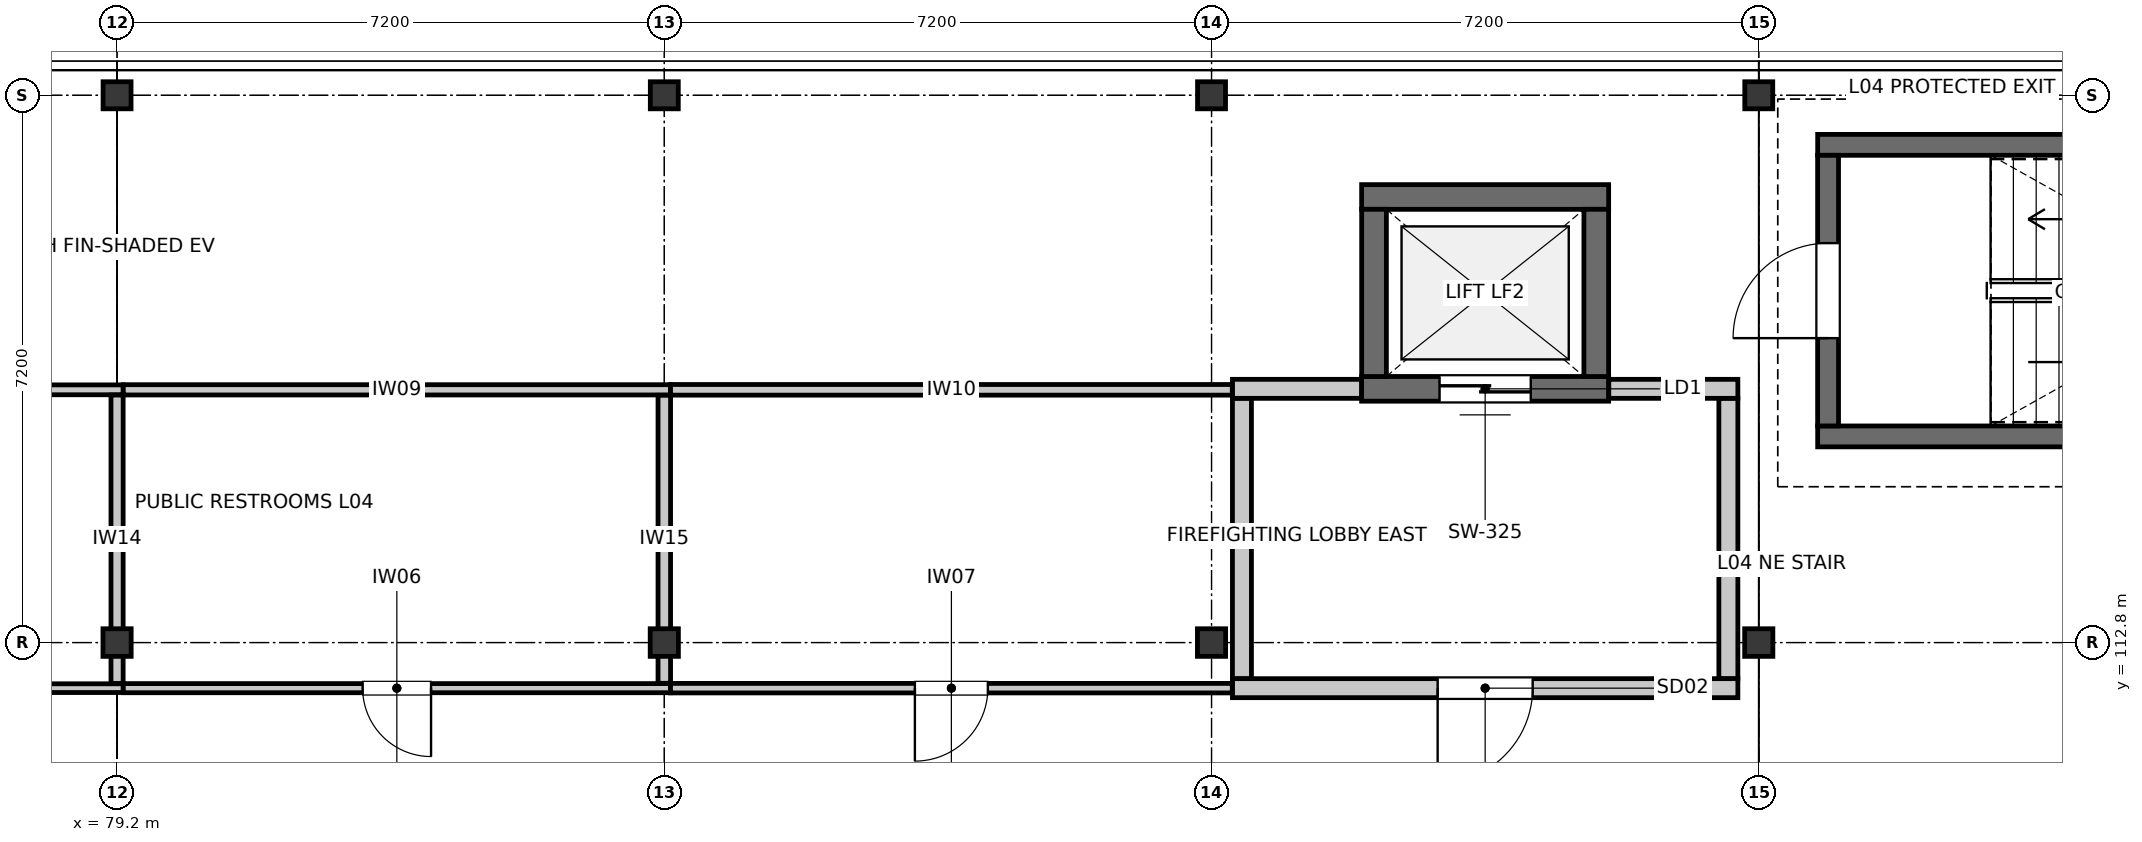
"""IFC4 building model, lengths in metres.
Left out: names, types, materials, properties, quantities, classifications, styles, units other than length and angle.
Written with IfcOpenShell. Run it as: python <this file> out.ifc"""

import sys

from ifc_helpers import new_model, si_unit, direction, frame, frame_2d, origin, origin_2d, place, context, subcontext, project, spatial, rectangle, i_section, extrude, element, fill, save


model = new_model("IFC4")
c1 = context("Model", 3, precision=1e-05, world=origin(), true_north=direction((0.0, 1.0)))
c2 = subcontext(c1, "Body", "Model", "MODEL_VIEW")
j1 = project(units=[si_unit("LENGTHUNIT", "METRE"), si_unit("PLANEANGLEUNIT", "RADIAN")], contexts=[c1])
p1 = place(None, origin())
s1 = spatial("IfcSite", under=j1, at=p1, CompositionType="ELEMENT")
p2 = place(p1, origin())
s2 = spatial("IfcBuilding", under=s1, at=p2, CompositionType="ELEMENT")
p3 = place(p2, frame((0.0, 0.0, 17.1)))
s3 = spatial("IfcBuildingStorey", under=s2, at=p3, CompositionType="ELEMENT", Elevation=17.1)
p4 = place(p3, frame((79.2, 112.8, 0.0), z_axis=(0.0, 0.0, 1.0), x_axis=(1.0, 0.0, 0.0)))
e1 = element("IfcColumn", 1, at=p4, inside=s3, PredefinedType="COLUMN", context=c2, shape_type="SweptSolid", body=[
    extrude(i_section(OverallWidth=0.371, OverallDepth=0.363, WebThickness=0.013, FlangeThickness=0.022, FilletRadius=0.015, at=origin_2d()), origin(), (0.0, 0.0, 1.0), 3.9),
])
p5 = place(p3, frame((79.2, 120.0, 0.0), z_axis=(0.0, 0.0, 1.0), x_axis=(1.0, 0.0, 0.0)))
e2 = element("IfcColumn", 2, at=p5, inside=s3, PredefinedType="COLUMN", context=c2, shape_type="SweptSolid", body=[
    extrude(i_section(OverallWidth=0.368, OverallDepth=0.356, WebThickness=0.011, FlangeThickness=0.018, FilletRadius=0.015, at=origin_2d()), origin(), (0.0, 0.0, 1.0), 3.9),
])
p6 = place(p3, frame((86.4, 112.8, 0.0), z_axis=(0.0, 0.0, 1.0), x_axis=(1.0, 0.0, 0.0)))
e3 = element("IfcColumn", 3, at=p6, inside=s3, PredefinedType="COLUMN", context=c2, shape_type="SweptSolid", body=[
    extrude(i_section(OverallWidth=0.371, OverallDepth=0.363, WebThickness=0.013, FlangeThickness=0.022, FilletRadius=0.015, at=origin_2d()), origin(), (0.0, 0.0, 1.0), 3.9),
])
p7 = place(p3, frame((86.4, 120.0, 0.0), z_axis=(0.0, 0.0, 1.0), x_axis=(1.0, 0.0, 0.0)))
e4 = element("IfcColumn", 4, at=p7, inside=s3, PredefinedType="COLUMN", context=c2, shape_type="SweptSolid", body=[
    extrude(i_section(OverallWidth=0.368, OverallDepth=0.356, WebThickness=0.011, FlangeThickness=0.018, FilletRadius=0.015, at=origin_2d()), origin(), (0.0, 0.0, 1.0), 3.9),
])
p8 = place(p3, frame((93.6, 112.8, 0.0), z_axis=(0.0, 0.0, 1.0), x_axis=(1.0, 0.0, 0.0)))
e5 = element("IfcColumn", 5, at=p8, inside=s3, PredefinedType="COLUMN", context=c2, shape_type="SweptSolid", body=[
    extrude(i_section(OverallWidth=0.371, OverallDepth=0.363, WebThickness=0.013, FlangeThickness=0.022, FilletRadius=0.015, at=origin_2d()), origin(), (0.0, 0.0, 1.0), 3.9),
])
p9 = place(p3, frame((93.6, 120.0, 0.0), z_axis=(0.0, 0.0, 1.0), x_axis=(1.0, 0.0, 0.0)))
e6 = element("IfcColumn", 6, at=p9, inside=s3, PredefinedType="COLUMN", context=c2, shape_type="SweptSolid", body=[
    extrude(i_section(OverallWidth=0.368, OverallDepth=0.356, WebThickness=0.011, FlangeThickness=0.018, FilletRadius=0.015, at=origin_2d()), origin(), (0.0, 0.0, 1.0), 3.9),
])
p10 = place(p3, frame((100.8, 112.8, 0.0), z_axis=(0.0, 0.0, 1.0), x_axis=(1.0, 0.0, 0.0)))
e7 = element("IfcColumn", 7, at=p10, inside=s3, PredefinedType="COLUMN", context=c2, shape_type="SweptSolid", body=[
    extrude(i_section(OverallWidth=0.371, OverallDepth=0.363, WebThickness=0.013, FlangeThickness=0.022, FilletRadius=0.015, at=origin_2d()), origin(), (0.0, 0.0, 1.0), 3.9),
])
p11 = place(p3, frame((100.8, 120.0, 0.0), z_axis=(0.0, 0.0, 1.0), x_axis=(1.0, 0.0, 0.0)))
e8 = element("IfcColumn", 8, at=p11, inside=s3, PredefinedType="COLUMN", context=c2, shape_type="SweptSolid", body=[
    extrude(i_section(OverallWidth=0.368, OverallDepth=0.356, WebThickness=0.011, FlangeThickness=0.018, FilletRadius=0.015, at=origin_2d()), origin(), (0.0, 0.0, 1.0), 3.9),
])
for number, where, z_axis, x_axis in (
    (9, (110.475, 115.512, 0.0), (0.0, 0.0, 1.0), (-1.0, 0.0, 0.0)),
    (10, (101.575, 119.348, 0.0), (0.0, 0.0, 1.0), (1.0, 0.0, 0.0)),
):
    element("IfcWall", number, at=place(p3, frame(where, z_axis=z_axis, x_axis=x_axis)), inside=s3, PredefinedType="SOLIDWALL", context=c2, shape_type="SweptSolid", body=[
        extrude(rectangle(XDim=8.9, YDim=0.275, at=frame_2d((4.45, 0.0))), origin(), (0.0, 0.0, 1.0), 3.64),
    ])
p12 = place(p3, frame((101.712, 115.65, 0.0), z_axis=(0.0, 0.0, 1.0), x_axis=(0.0, 1.0, 0.0)))
e11 = element("IfcWall", 11, at=p12, inside=s3, PredefinedType="SOLIDWALL", context=c2, shape_type="SweptSolid", body=[
    extrude(rectangle(XDim=3.56, YDim=0.275, at=frame_2d((1.78, 0.0))), origin(), (0.0, 0.0, 1.0), 3.64),
])
p13 = place(p12, frame((1.155, 0.0, 0.0)))
e12 = element("IfcOpeningElement", 12, at=p13, cuts=e11, PredefinedType="OPENING", context=c2, shape_type="SweptSolid", body=[
    extrude(rectangle(XDim=1.25, YDim=2.2, at=frame_2d((0.625, 1.1))), frame((0.0, 0.147, 0.0), z_axis=(0.0, -1.0, 0.0), x_axis=(1.0, 0.0, 0.0)), (0.0, 0.0, 1.0), 0.295),
])
p14 = place(p3, frame((98.825, 116.138, 0.0), z_axis=(0.0, 0.0, 1.0), x_axis=(-1.0, 0.0, 0.0)))
e13 = element("IfcWall", 13, at=p14, inside=s3, PredefinedType="SHEAR", context=c2, shape_type="SweptSolid", body=[
    extrude(rectangle(XDim=3.25, YDim=0.325, at=frame_2d((1.625, 0.0))), origin(), (0.0, 0.0, 1.0), 3.64),
])
p15 = place(p14, frame((1.025, 0.0, 0.0)))
e14 = element("IfcOpeningElement", 14, at=p15, cuts=e13, PredefinedType="OPENING", context=c2, shape_type="SweptSolid", body=[
    extrude(rectangle(XDim=1.2, YDim=2.2, at=frame_2d((0.6, 1.1))), frame((0.0, 0.172, 0.0), z_axis=(0.0, -1.0, 0.0), x_axis=(1.0, 0.0, 0.0)), (0.0, 0.0, 1.0), 0.345),
])
p16 = place(p3, frame((95.575, 118.662, 0.0), z_axis=(0.0, 0.0, 1.0), x_axis=(1.0, 0.0, 0.0)))
e15 = element("IfcWall", 15, at=p16, inside=s3, PredefinedType="SHEAR", context=c2, shape_type="SweptSolid", body=[
    extrude(rectangle(XDim=3.25, YDim=0.325, at=frame_2d((1.625, 0.0))), origin(), (0.0, 0.0, 1.0), 3.64),
])
for number, where, z_axis, x_axis in (
    (16, (95.738, 116.3, 0.0), (0.0, 0.0, 1.0), (0.0, 1.0, 0.0)),
    (17, (98.662, 118.5, 0.0), (0.0, 0.0, 1.0), (0.0, -1.0, 0.0)),
):
    element("IfcWall", number, at=place(p3, frame(where, z_axis=z_axis, x_axis=x_axis)), inside=s3, PredefinedType="SHEAR", context=c2, shape_type="SweptSolid", body=[
        extrude(rectangle(XDim=2.2, YDim=0.325, at=frame_2d((1.1, 0.0))), origin(), (0.0, 0.0, 1.0), 3.64),
    ])
p17 = place(p3, frame((100.525, 112.2, 0.0), z_axis=(0.0, 0.0, 1.0), x_axis=(-1.0, 0.0, 0.0)))
e18 = element("IfcWall", 18, at=p17, inside=s3, PredefinedType="PARTITIONING", context=c2, shape_type="SweptSolid", body=[
    extrude(rectangle(XDim=6.65, YDim=0.25, at=frame_2d((3.325, 0.0))), origin(), (0.0, 0.0, 1.0), 2.863),
])
p18 = place(p17, frame((2.7, 0.0, 0.0)))
e19 = element("IfcOpeningElement", 19, at=p18, cuts=e18, PredefinedType="OPENING", context=c2, shape_type="SweptSolid", body=[
    extrude(rectangle(XDim=1.25, YDim=2.2, at=frame_2d((0.625, 1.1))), frame((0.0, 0.135, 0.0), z_axis=(0.0, -1.0, 0.0), x_axis=(1.0, 0.0, 0.0)), (0.0, 0.0, 1.0), 0.27),
])
for number, where, z_axis, x_axis in (
    (20, (93.875, 116.138, 0.0), (0.0, 0.0, 1.0), (1.0, 0.0, 0.0)),
    (21, (98.827, 116.138, 0.0), (0.0, 0.0, 1.0), (1.0, 0.0, 0.0)),
):
    element("IfcWall", number, at=place(p3, frame(where, z_axis=z_axis, x_axis=x_axis)), inside=s3, PredefinedType="PARTITIONING", context=c2, shape_type="SweptSolid", body=[
        extrude(rectangle(XDim=1.698, YDim=0.25, at=frame_2d((0.849, 0.0))), origin(), (0.0, 0.0, 1.0), 2.863),
    ])
for number, where, z_axis, x_axis in (
    (22, (94.0, 112.327, 0.0), (0.0, 0.0, 1.0), (0.0, 1.0, 0.0)),
    (23, (100.4, 116.011, 0.0), (0.0, 0.0, 1.0), (0.0, -1.0, 0.0)),
):
    element("IfcWall", number, at=place(p3, frame(where, z_axis=z_axis, x_axis=x_axis)), inside=s3, PredefinedType="PARTITIONING", context=c2, shape_type="SweptSolid", body=[
        extrude(rectangle(XDim=3.684, YDim=0.25, at=frame_2d((1.842, 0.0))), origin(), (0.0, 0.0, 1.0), 2.863),
    ])
p19 = place(p3, frame((79.28, 112.2, 0.0), z_axis=(0.0, 0.0, 1.0), x_axis=(-1.0, 0.0, 0.0)))
e24 = element("IfcWall", 24, at=p19, inside=s3, PredefinedType="PARTITIONING", context=c2, shape_type="SweptSolid", body=[
    extrude(rectangle(XDim=14.753, YDim=0.115, at=frame_2d((7.376, 0.0))), origin(), (0.0, 0.0, 1.0), 2.863),
])
p20 = place(p19, frame((8.007, 0.0, 0.0)))
e25 = element("IfcOpeningElement", 25, at=p20, cuts=e24, PredefinedType="OPENING", context=c2, shape_type="SweptSolid", body=[
    extrude(rectangle(XDim=1.54, YDim=2.1, at=frame_2d((0.77, 1.05))), frame((0.0, 0.067, 0.0), z_axis=(0.0, -1.0, 0.0), x_axis=(1.0, 0.0, 0.0)), (0.0, 0.0, 1.0), 0.135),
])
p21 = place(p3, frame((86.48, 112.2, 0.0), z_axis=(0.0, 0.0, 1.0), x_axis=(-1.0, 0.0, 0.0)))
e26 = element("IfcWall", 26, at=p21, inside=s3, PredefinedType="PARTITIONING", context=c2, shape_type="SweptSolid", body=[
    extrude(rectangle(XDim=7.198, YDim=0.12, at=frame_2d((3.599, 0.0))), origin(), (0.0, 0.0, 1.0), 2.863),
])
p22 = place(p21, frame((3.149, 0.0, 0.0)))
e27 = element("IfcOpeningElement", 27, at=p22, cuts=e26, PredefinedType="OPENING", context=c2, shape_type="SweptSolid", body=[
    extrude(rectangle(XDim=0.9, YDim=2.16, at=frame_2d((0.45, 1.08))), frame((0.0, 0.07, 0.0), z_axis=(0.0, -1.0, 0.0), x_axis=(1.0, 0.0, 0.0)), (0.0, 0.0, 1.0), 0.14),
])
p23 = place(p3, frame((93.873, 112.2, 0.0), z_axis=(0.0, 0.0, 1.0), x_axis=(-1.0, 0.0, 0.0)))
e28 = element("IfcWall", 28, at=p23, inside=s3, PredefinedType="PARTITIONING", context=c2, shape_type="SweptSolid", body=[
    extrude(rectangle(XDim=7.391, YDim=0.125, at=frame_2d((3.696, 0.0))), origin(), (0.0, 0.0, 1.0), 2.863),
])
p24 = place(p23, frame((3.216, 0.0, 0.0)))
e29 = element("IfcOpeningElement", 29, at=p24, cuts=e28, PredefinedType="OPENING", context=c2, shape_type="SweptSolid", body=[
    extrude(rectangle(XDim=0.96, YDim=2.16, at=frame_2d((0.48, 1.08))), frame((0.0, 0.073, 0.0), z_axis=(0.0, -1.0, 0.0), x_axis=(1.0, 0.0, 0.0)), (0.0, 0.0, 1.0), 0.145),
])
p25 = place(p3, frame((64.527, 116.125, 0.0), z_axis=(0.0, 0.0, 1.0), x_axis=(1.0, 0.0, 0.0)))
e30 = element("IfcWall", 30, at=p25, inside=s3, PredefinedType="PARTITIONING", context=c2, shape_type="SweptSolid", body=[
    extrude(rectangle(XDim=14.753, YDim=0.13, at=frame_2d((7.376, 0.0))), origin(), (0.0, 0.0, 1.0), 2.863),
])
p26 = place(p3, frame((79.282, 116.125, 0.0), z_axis=(0.0, 0.0, 1.0), x_axis=(1.0, 0.0, 0.0)))
e31 = element("IfcWall", 31, at=p26, inside=s3, PredefinedType="PARTITIONING", context=c2, shape_type="SweptSolid", body=[
    extrude(rectangle(XDim=7.198, YDim=0.135, at=frame_2d((3.599, 0.0))), origin(), (0.0, 0.0, 1.0), 2.863),
])
p27 = place(p3, frame((86.482, 116.125, 0.0), z_axis=(0.0, 0.0, 1.0), x_axis=(1.0, 0.0, 0.0)))
e32 = element("IfcWall", 32, at=p27, inside=s3, PredefinedType="PARTITIONING", context=c2, shape_type="SweptSolid", body=[
    extrude(rectangle(XDim=7.391, YDim=0.14, at=frame_2d((3.696, 0.0))), origin(), (0.0, 0.0, 1.0), 2.863),
])
p28 = place(p3, frame((79.2, 116.056, 0.0), z_axis=(0.0, 0.0, 1.0), x_axis=(0.0, -1.0, 0.0)))
e33 = element("IfcWall", 33, at=p28, inside=s3, PredefinedType="PARTITIONING", context=c2, shape_type="SweptSolid", body=[
    extrude(rectangle(XDim=3.794, YDim=0.16, at=frame_2d((1.897, 0.0))), origin(), (0.0, 0.0, 1.0), 2.863),
])
p29 = place(p3, frame((86.4, 116.053, 0.0), z_axis=(0.0, 0.0, 1.0), x_axis=(0.0, -1.0, 0.0)))
e34 = element("IfcWall", 34, at=p29, inside=s3, PredefinedType="PARTITIONING", context=c2, shape_type="SweptSolid", body=[
    extrude(rectangle(XDim=3.789, YDim=0.165, at=frame_2d((1.895, 0.0))), origin(), (0.0, 0.0, 1.0), 2.863),
])
p30 = place(p13, origin())
e35 = element("IfcDoor", 35, at=p30, inside=s3, OperationType="SINGLE_SWING_LEFT", PredefinedType="DOOR", context=c2, shape_type="SweptSolid", body=[
    extrude(rectangle(XDim=1.25, YDim=2.2, at=frame_2d((0.625, 1.1))), frame((0.0, 0.025, 0.0), z_axis=(0.0, -1.0, 0.0), x_axis=(1.0, 0.0, 0.0)), (0.0, 0.0, 1.0), 0.05),
])
fill(e12, e35)
p31 = place(p15, origin())
e36 = element("IfcDoor", 36, at=p31, inside=s3, OperationType="DOUBLE_DOOR_SLIDING", PredefinedType="DOOR", context=c2, shape_type="SweptSolid", body=[
    extrude(rectangle(XDim=1.2, YDim=2.2, at=frame_2d((0.6, 1.1))), frame((0.0, 0.025, 0.0), z_axis=(0.0, -1.0, 0.0), x_axis=(1.0, 0.0, 0.0)), (0.0, 0.0, 1.0), 0.05),
])
fill(e14, e36)
p32 = place(p18, origin())
e37 = element("IfcDoor", 37, at=p32, inside=s3, OperationType="SINGLE_SWING_RIGHT", PredefinedType="DOOR", context=c2, shape_type="SweptSolid", body=[
    extrude(rectangle(XDim=1.25, YDim=2.2, at=frame_2d((0.625, 1.1))), frame((0.0, 0.025, 0.0), z_axis=(0.0, -1.0, 0.0), x_axis=(1.0, 0.0, 0.0)), (0.0, 0.0, 1.0), 0.05),
])
fill(e19, e37)
p33 = place(p22, origin())
e38 = element("IfcDoor", 38, at=p33, inside=s3, OperationType="SINGLE_SWING_LEFT", PredefinedType="DOOR", context=c2, shape_type="SweptSolid", body=[
    extrude(rectangle(XDim=0.9, YDim=2.16, at=frame_2d((0.45, 1.08))), frame((0.0, 0.025, 0.0), z_axis=(0.0, -1.0, 0.0), x_axis=(1.0, 0.0, 0.0)), (0.0, 0.0, 1.0), 0.05),
])
fill(e27, e38)
p34 = place(p24, origin())
e39 = element("IfcDoor", 39, at=p34, inside=s3, OperationType="SINGLE_SWING_RIGHT", PredefinedType="DOOR", context=c2, shape_type="SweptSolid", body=[
    extrude(rectangle(XDim=0.96, YDim=2.16, at=frame_2d((0.48, 1.08))), frame((0.0, 0.025, 0.0), z_axis=(0.0, -1.0, 0.0), x_axis=(1.0, 0.0, 0.0)), (0.0, 0.0, 1.0), 0.05),
])
fill(e29, e39)
save(model, sys.argv[1])
